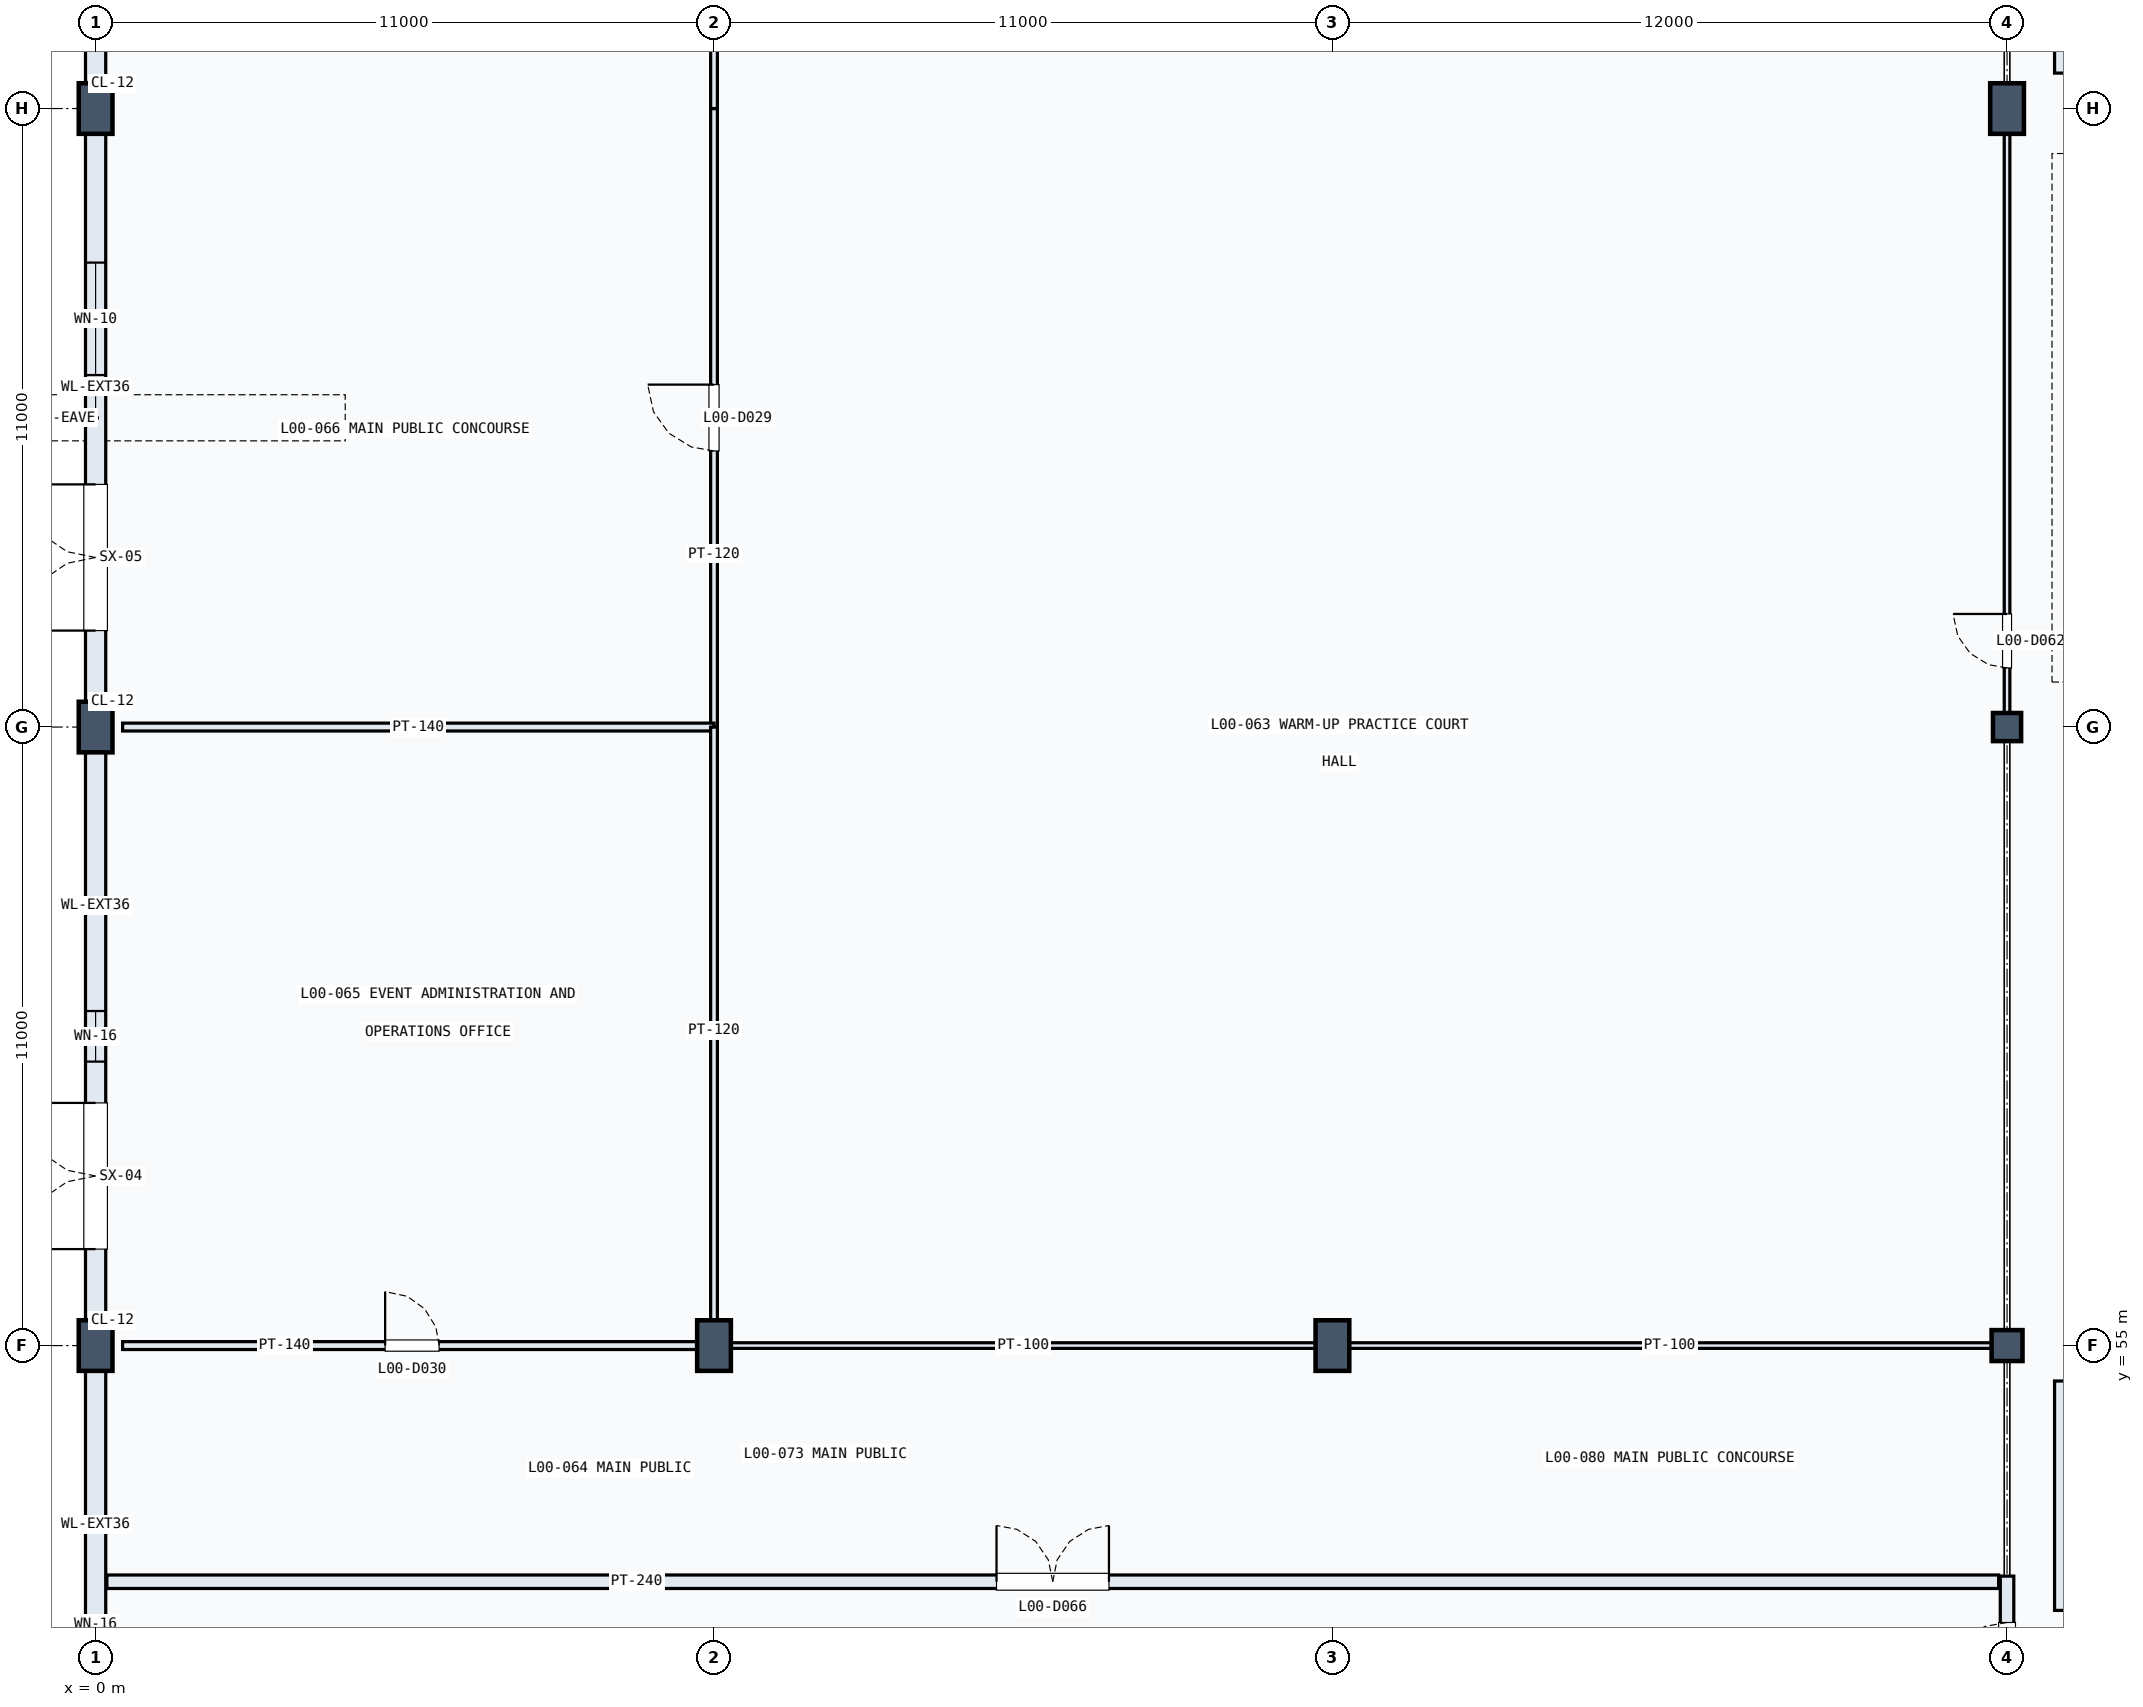
"""IFC4 building model, lengths in metres.
Left out: names, types, materials, properties, quantities, classifications, styles, units other than length and angle.
Written with IfcOpenShell. Run it as: python <this file> out.ifc"""

import sys

from ifc_helpers import new_model, si_unit, direction, frame, frame_2d, origin, origin_2d, place, context, subcontext, project, spatial, rectangle, extrude, element, fill, save


model = new_model("IFC4")
c1 = context("Model", 3, precision=1e-05, world=origin(), true_north=direction((0.0, 1.0)))
c2 = subcontext(c1, "Body", "Model", "MODEL_VIEW")
j1 = project(units=[si_unit("LENGTHUNIT", "METRE"), si_unit("PLANEANGLEUNIT", "RADIAN")], contexts=[c1])
p1 = place(None, origin())
s1 = spatial("IfcSite", under=j1, at=p1, CompositionType="ELEMENT")
p2 = place(p1, origin())
s2 = spatial("IfcBuilding", under=s1, at=p2, CompositionType="ELEMENT")
p3 = place(p2, origin())
s3 = spatial("IfcBuildingStorey", under=s2, at=p3, CompositionType="ELEMENT", Elevation=0.0)
for number, where, z_axis, x_axis in (
    (1, (0.0, 55.0, 0.0), (0.0, 0.0, 1.0), (1.0, 0.0, 0.0)),
    (2, (0.0, 66.0, 0.0), (0.0, 0.0, 1.0), (1.0, 0.0, 0.0)),
    (3, (0.0, 77.0, 0.0), (0.0, 0.0, 1.0), (1.0, 0.0, 0.0)),
    (4, (11.0, 55.0, 0.0), (0.0, 0.0, 1.0), (1.0, 0.0, 0.0)),
    (5, (22.0, 55.0, 0.0), (0.0, 0.0, 1.0), (1.0, 0.0, 0.0)),
):
    element("IfcColumn", number, at=place(p3, frame(where, z_axis=z_axis, x_axis=x_axis)), inside=s3, PredefinedType="COLUMN", context=c2, shape_type="SweptSolid", body=[
        extrude(rectangle(XDim=0.6, YDim=0.9, at=origin_2d()), origin(), (0.0, 0.0, 1.0), 5.4),
    ])
p4 = place(p3, frame((34.0, 55.0, 0.0), z_axis=(0.0, 0.0, 1.0), x_axis=(1.0, 0.0, 0.0)))
e6 = element("IfcColumn", 6, at=p4, inside=s3, PredefinedType="COLUMN", context=c2, shape_type="SweptSolid", body=[
    extrude(rectangle(XDim=0.55, YDim=0.55, at=origin_2d()), origin(), (0.0, 0.0, 1.0), 5.4),
])
p5 = place(p3, frame((34.0, 66.0, 0.0), z_axis=(0.0, 0.0, 1.0), x_axis=(1.0, 0.0, 0.0)))
e7 = element("IfcColumn", 7, at=p5, inside=s3, PredefinedType="COLUMN", context=c2, shape_type="SweptSolid", body=[
    extrude(rectangle(XDim=0.5, YDim=0.5, at=origin_2d()), origin(), (0.0, 0.0, 1.0), 5.4),
])
p6 = place(p3, frame((34.0, 77.0, 0.0), z_axis=(0.0, 0.0, 1.0), x_axis=(1.0, 0.0, 0.0)))
e8 = element("IfcColumn", 8, at=p6, inside=s3, PredefinedType="COLUMN", context=c2, shape_type="SweptSolid", body=[
    extrude(rectangle(XDim=0.6, YDim=0.9, at=origin_2d()), origin(), (0.0, 0.0, 1.0), 5.4),
])
p7 = place(p3, frame((0.0, 44.22, 0.0), z_axis=(0.0, 0.0, 1.0), x_axis=(0.0, 1.0, 0.0)))
e9 = element("IfcWall", 9, at=p7, inside=s3, PredefinedType="SOLIDWALL", context=c2, shape_type="SweptSolid", body=[
    extrude(rectangle(XDim=10.56, YDim=0.36, at=frame_2d((5.28, 0.0))), origin(), (0.0, 0.0, 1.0), 4.45),
])
p8 = place(p7, frame((1.496, 0.0, 0.0)))
e10 = element("IfcOpeningElement", 10, at=p8, cuts=e9, PredefinedType="OPENING", context=c2, shape_type="SweptSolid", body=[
    extrude(rectangle(XDim=2.6, YDim=2.4, at=frame_2d((1.3, 1.2))), frame((0.0, 0.19, 0.0), z_axis=(0.0, -1.0, 0.0), x_axis=(1.0, 0.0, 0.0)), (0.0, 0.0, 1.0), 0.38),
])
p9 = place(p7, frame((4.83, 0.0, 0.8)))
e11 = element("IfcOpeningElement", 11, at=p9, cuts=e9, PredefinedType="OPENING", context=c2, shape_type="SweptSolid", body=[
    extrude(rectangle(XDim=0.9, YDim=1.8, at=frame_2d((0.45, 0.9))), frame((0.0, 0.19, 0.0), z_axis=(0.0, -1.0, 0.0), x_axis=(1.0, 0.0, 0.0)), (0.0, 0.0, 1.0), 0.38),
])
p10 = place(p3, frame((0.0, 55.22, 0.0), z_axis=(0.0, 0.0, 1.0), x_axis=(0.0, 1.0, 0.0)))
e12 = element("IfcWall", 12, at=p10, inside=s3, PredefinedType="SOLIDWALL", context=c2, shape_type="SweptSolid", body=[
    extrude(rectangle(XDim=10.56, YDim=0.36, at=frame_2d((5.28, 0.0))), origin(), (0.0, 0.0, 1.0), 4.45),
])
p11 = place(p10, frame((1.496, 0.0, 0.0)))
e13 = element("IfcOpeningElement", 13, at=p11, cuts=e12, PredefinedType="OPENING", context=c2, shape_type="SweptSolid", body=[
    extrude(rectangle(XDim=2.6, YDim=2.4, at=frame_2d((1.3, 1.2))), frame((0.0, 0.19, 0.0), z_axis=(0.0, -1.0, 0.0), x_axis=(1.0, 0.0, 0.0)), (0.0, 0.0, 1.0), 0.38),
])
p12 = place(p10, frame((4.83, 0.0, 0.8)))
e14 = element("IfcOpeningElement", 14, at=p12, cuts=e12, PredefinedType="OPENING", context=c2, shape_type="SweptSolid", body=[
    extrude(rectangle(XDim=0.9, YDim=1.8, at=frame_2d((0.45, 0.9))), frame((0.0, 0.19, 0.0), z_axis=(0.0, -1.0, 0.0), x_axis=(1.0, 0.0, 0.0)), (0.0, 0.0, 1.0), 0.38),
])
p13 = place(p3, frame((0.0, 66.22, 0.0), z_axis=(0.0, 0.0, 1.0), x_axis=(0.0, 1.0, 0.0)))
e15 = element("IfcWall", 15, at=p13, inside=s3, PredefinedType="SOLIDWALL", context=c2, shape_type="SweptSolid", body=[
    extrude(rectangle(XDim=10.56, YDim=0.36, at=frame_2d((5.28, 0.0))), origin(), (0.0, 0.0, 1.0), 4.45),
])
p14 = place(p13, frame((1.496, 0.0, 0.0)))
e16 = element("IfcOpeningElement", 16, at=p14, cuts=e15, PredefinedType="OPENING", context=c2, shape_type="SweptSolid", body=[
    extrude(rectangle(XDim=2.6, YDim=2.4, at=frame_2d((1.3, 1.2))), frame((0.0, 0.19, 0.0), z_axis=(0.0, -1.0, 0.0), x_axis=(1.0, 0.0, 0.0)), (0.0, 0.0, 1.0), 0.38),
])
p15 = place(p13, frame((6.04, 0.0, 0.9)))
e17 = element("IfcOpeningElement", 17, at=p15, cuts=e15, PredefinedType="OPENING", context=c2, shape_type="SweptSolid", body=[
    extrude(rectangle(XDim=2.0, YDim=1.65, at=frame_2d((1.0, 0.825))), frame((0.0, 0.19, 0.0), z_axis=(0.0, -1.0, 0.0), x_axis=(1.0, 0.0, 0.0)), (0.0, 0.0, 1.0), 0.38),
])
p16 = place(p3, frame((0.0, 77.22, 0.0), z_axis=(0.0, 0.0, 1.0), x_axis=(0.0, 1.0, 0.0)))
e18 = element("IfcWall", 18, at=p16, inside=s3, PredefinedType="SOLIDWALL", context=c2, shape_type="SweptSolid", body=[
    extrude(rectangle(XDim=10.56, YDim=0.36, at=frame_2d((5.28, 0.0))), origin(), (0.0, 0.0, 1.0), 4.45),
])
p17 = place(p16, frame((1.496, 0.0, 0.0)))
e19 = element("IfcOpeningElement", 19, at=p17, cuts=e18, PredefinedType="OPENING", context=c2, shape_type="SweptSolid", body=[
    extrude(rectangle(XDim=2.6, YDim=2.4, at=frame_2d((1.3, 1.2))), frame((0.0, 0.19, 0.0), z_axis=(0.0, -1.0, 0.0), x_axis=(1.0, 0.0, 0.0)), (0.0, 0.0, 1.0), 0.38),
])
p18 = place(p16, frame((5.94, 0.0, 0.85)))
e20 = element("IfcOpeningElement", 20, at=p18, cuts=e18, PredefinedType="OPENING", context=c2, shape_type="SweptSolid", body=[
    extrude(rectangle(XDim=2.2, YDim=1.95, at=frame_2d((1.1, 0.975))), frame((0.0, 0.19, 0.0), z_axis=(0.0, -1.0, 0.0), x_axis=(1.0, 0.0, 0.0)), (0.0, 0.0, 1.0), 0.38),
])
for number, where, z_axis, x_axis in (
    (21, (34.96, 77.63, 0.0), (0.0, 0.0, 1.0), (0.0, 1.0, 0.0)),
    (22, (34.96, 50.29, 0.0), (0.0, 0.0, 1.0), (0.0, 1.0, 0.0)),
):
    element("IfcWall", number, at=place(p3, frame(where, z_axis=z_axis, x_axis=x_axis)), inside=s3, PredefinedType="SOLIDWALL", context=c2, shape_type="SweptSolid", body=[
        extrude(rectangle(XDim=4.08, YDim=0.23, at=frame_2d((2.04, 0.0))), origin(), (0.0, 0.0, 1.0), 4.45),
    ])
p19 = place(p3, frame((11.0, 66.0, 0.0), z_axis=(0.0, 0.0, 1.0), x_axis=(0.0, 1.0, 0.0)))
e23 = element("IfcWall", 23, at=p19, inside=s3, PredefinedType="PARTITIONING", context=c2, shape_type="SweptSolid", body=[
    extrude(rectangle(XDim=11.0, YDim=0.12, at=frame_2d((5.5, 0.0))), origin(), (0.0, 0.0, 1.0), 5.06),
])
p20 = place(p19, frame((4.91, 0.0, 0.0)))
e24 = element("IfcOpeningElement", 24, at=p20, cuts=e23, PredefinedType="OPENING", context=c2, shape_type="SweptSolid", body=[
    extrude(rectangle(XDim=1.18, YDim=2.15, at=frame_2d((0.59, 1.075))), frame((0.0, 0.07, 0.0), z_axis=(0.0, -1.0, 0.0), x_axis=(1.0, 0.0, 0.0)), (0.0, 0.0, 1.0), 0.14),
])
p21 = place(p3, frame((11.0, 77.0, 0.0), z_axis=(0.0, 0.0, 1.0), x_axis=(0.0, 1.0, 0.0)))
e25 = element("IfcWall", 25, at=p21, inside=s3, PredefinedType="PARTITIONING", context=c2, shape_type="SweptSolid", body=[
    extrude(rectangle(XDim=10.78, YDim=0.12, at=frame_2d((5.39, 0.0))), origin(), (0.0, 0.0, 1.0), 4.15),
])
p22 = place(p3, frame((11.22, 55.0, 0.0), z_axis=(0.0, 0.0, 1.0), x_axis=(1.0, 0.0, 0.0)))
e26 = element("IfcWall", 26, at=p22, inside=s3, PredefinedType="PARTITIONING", context=c2, shape_type="SweptSolid", body=[
    extrude(rectangle(XDim=10.56, YDim=0.1, at=frame_2d((5.28, 0.0))), origin(), (0.0, 0.0, 1.0), 4.438),
])
p23 = place(p3, frame((22.22, 55.0, 0.0), z_axis=(0.0, 0.0, 1.0), x_axis=(1.0, 0.0, 0.0)))
e27 = element("IfcWall", 27, at=p23, inside=s3, PredefinedType="PARTITIONING", context=c2, shape_type="SweptSolid", body=[
    extrude(rectangle(XDim=11.56, YDim=0.1, at=frame_2d((5.78, 0.0))), origin(), (0.0, 0.0, 1.0), 4.25),
])
p24 = place(p3, frame((0.48, 55.0, 0.0), z_axis=(0.0, 0.0, 1.0), x_axis=(1.0, 0.0, 0.0)))
e28 = element("IfcWall", 28, at=p24, inside=s3, PredefinedType="PARTITIONING", context=c2, shape_type="SweptSolid", body=[
    extrude(rectangle(XDim=10.3, YDim=0.14, at=frame_2d((5.15, 0.0))), origin(), (0.0, 0.0, 1.0), 4.438),
])
p25 = place(p24, frame((4.67, 0.0, 0.0)))
e29 = element("IfcOpeningElement", 29, at=p25, cuts=e28, PredefinedType="OPENING", context=c2, shape_type="SweptSolid", body=[
    extrude(rectangle(XDim=0.96, YDim=2.15, at=frame_2d((0.48, 1.075))), frame((0.0, 0.08, 0.0), z_axis=(0.0, -1.0, 0.0), x_axis=(1.0, 0.0, 0.0)), (0.0, 0.0, 1.0), 0.16),
])
p26 = place(p3, frame((0.48, 66.0, 0.0), z_axis=(0.0, 0.0, 1.0), x_axis=(1.0, 0.0, 0.0)))
e30 = element("IfcWall", 30, at=p26, inside=s3, PredefinedType="PARTITIONING", context=c2, shape_type="SweptSolid", body=[
    extrude(rectangle(XDim=10.52, YDim=0.14, at=frame_2d((5.26, 0.0))), origin(), (0.0, 0.0, 1.0), 4.55),
])
p27 = place(p3, frame((11.0, 55.22, 0.0), z_axis=(0.0, 0.0, 1.0), x_axis=(0.0, 1.0, 0.0)))
e31 = element("IfcWall", 31, at=p27, inside=s3, PredefinedType="PARTITIONING", context=c2, shape_type="SweptSolid", body=[
    extrude(rectangle(XDim=10.78, YDim=0.12, at=frame_2d((5.39, 0.0))), origin(), (0.0, 0.0, 1.0), 4.438),
])
p28 = place(p3, frame((34.0, 66.21, 0.0), z_axis=(0.0, 0.0, 1.0), x_axis=(0.0, 1.0, 0.0)))
e32 = element("IfcWall", 32, at=p28, inside=s3, PredefinedType="PARTITIONING", context=c2, shape_type="SweptSolid", body=[
    extrude(rectangle(XDim=10.57, YDim=0.1, at=frame_2d((5.285, 0.0))), origin(), (0.0, 0.0, 1.0), 4.35),
])
p29 = place(p28, frame((0.841, 0.0, 0.0)))
e33 = element("IfcOpeningElement", 33, at=p29, cuts=e32, PredefinedType="OPENING", context=c2, shape_type="SweptSolid", body=[
    extrude(rectangle(XDim=0.96, YDim=2.15, at=frame_2d((0.48, 1.075))), frame((0.0, 0.06, 0.0), z_axis=(0.0, -1.0, 0.0), x_axis=(1.0, 0.0, 0.0)), (0.0, 0.0, 1.0), 0.12),
])
p30 = place(p3, frame((0.2, 50.8, 0.0), z_axis=(0.0, 0.0, 1.0), x_axis=(1.0, 0.0, 0.0)))
e34 = element("IfcWall", 34, at=p30, inside=s3, PredefinedType="PARTITIONING", context=c2, shape_type="SweptSolid", body=[
    extrude(rectangle(XDim=33.65, YDim=0.24, at=frame_2d((16.825, 0.0))), origin(), (0.0, 0.0, 1.0), 4.25),
])
p31 = place(p30, frame((15.825, 0.0, 0.0)))
e35 = element("IfcOpeningElement", 35, at=p31, cuts=e34, PredefinedType="OPENING", context=c2, shape_type="SweptSolid", body=[
    extrude(rectangle(XDim=2.0, YDim=2.25, at=frame_2d((1.0, 1.125))), frame((0.0, 0.13, 0.0), z_axis=(0.0, -1.0, 0.0), x_axis=(1.0, 0.0, 0.0)), (0.0, 0.0, 1.0), 0.26),
])
p32 = place(p3, frame((34.0, 48.1, 0.0), z_axis=(0.0, 0.0, 1.0), x_axis=(0.0, 1.0, 0.0)))
e36 = element("IfcWall", 36, at=p32, inside=s3, PredefinedType="PARTITIONING", context=c2, shape_type="SweptSolid", body=[
    extrude(rectangle(XDim=2.8, YDim=0.24, at=frame_2d((1.4, 0.0))), origin(), (0.0, 0.0, 1.0), 4.25),
])
p33 = place(p32, frame((0.825, 0.0, 0.0)))
e37 = element("IfcOpeningElement", 37, at=p33, cuts=e36, PredefinedType="OPENING", context=c2, shape_type="SweptSolid", body=[
    extrude(rectangle(XDim=1.15, YDim=2.2, at=frame_2d((0.575, 1.1))), frame((0.0, 0.13, 0.0), z_axis=(0.0, -1.0, 0.0), x_axis=(1.0, 0.0, 0.0)), (0.0, 0.0, 1.0), 0.26),
])
p34 = place(p11, origin())
e38 = element("IfcDoor", 38, at=p34, inside=s3, OperationType="DOUBLE_DOOR_SINGLE_SWING", PredefinedType="DOOR", context=c2, shape_type="SweptSolid", body=[
    extrude(rectangle(XDim=2.6, YDim=2.4, at=frame_2d((1.3, 1.2))), frame((0.0, 0.025, 0.0), z_axis=(0.0, -1.0, 0.0), x_axis=(1.0, 0.0, 0.0)), (0.0, 0.0, 1.0), 0.05),
])
fill(e13, e38)
p35 = place(p14, origin())
e39 = element("IfcDoor", 39, at=p35, inside=s3, OperationType="DOUBLE_DOOR_SINGLE_SWING", PredefinedType="DOOR", context=c2, shape_type="SweptSolid", body=[
    extrude(rectangle(XDim=2.6, YDim=2.4, at=frame_2d((1.3, 1.2))), frame((0.0, 0.025, 0.0), z_axis=(0.0, -1.0, 0.0), x_axis=(1.0, 0.0, 0.0)), (0.0, 0.0, 1.0), 0.05),
])
fill(e16, e39)
p36 = place(p12, origin())
e40 = element("IfcWindow", 40, at=p36, inside=s3, PartitioningType="SINGLE_PANEL", PredefinedType="WINDOW", context=c2, shape_type="SweptSolid", body=[
    extrude(rectangle(XDim=0.9, YDim=1.8, at=frame_2d((0.45, 0.9))), frame((0.0, 0.03, 0.0), z_axis=(0.0, -1.0, 0.0), x_axis=(1.0, 0.0, 0.0)), (0.0, 0.0, 1.0), 0.06),
])
fill(e14, e40)
p37 = place(p15, origin())
e41 = element("IfcWindow", 41, at=p37, inside=s3, PartitioningType="SINGLE_PANEL", PredefinedType="WINDOW", context=c2, shape_type="SweptSolid", body=[
    extrude(rectangle(XDim=2.0, YDim=1.65, at=frame_2d((1.0, 0.825))), frame((0.0, 0.03, 0.0), z_axis=(0.0, -1.0, 0.0), x_axis=(1.0, 0.0, 0.0)), (0.0, 0.0, 1.0), 0.06),
])
fill(e17, e41)
p38 = place(p20, origin())
e42 = element("IfcDoor", 42, at=p38, inside=s3, OperationType="SINGLE_SWING_RIGHT", PredefinedType="DOOR", context=c2, shape_type="SweptSolid", body=[
    extrude(rectangle(XDim=1.18, YDim=2.15, at=frame_2d((0.59, 1.075))), frame((0.0, 0.025, 0.0), z_axis=(0.0, -1.0, 0.0), x_axis=(1.0, 0.0, 0.0)), (0.0, 0.0, 1.0), 0.05),
])
fill(e24, e42)
p39 = place(p25, origin())
e43 = element("IfcDoor", 43, at=p39, inside=s3, OperationType="SINGLE_SWING_LEFT", PredefinedType="DOOR", context=c2, shape_type="SweptSolid", body=[
    extrude(rectangle(XDim=0.96, YDim=2.15, at=frame_2d((0.48, 1.075))), frame((0.0, 0.025, 0.0), z_axis=(0.0, -1.0, 0.0), x_axis=(1.0, 0.0, 0.0)), (0.0, 0.0, 1.0), 0.05),
])
fill(e29, e43)
p40 = place(p29, origin())
e44 = element("IfcDoor", 44, at=p40, inside=s3, OperationType="SINGLE_SWING_RIGHT", PredefinedType="DOOR", context=c2, shape_type="SweptSolid", body=[
    extrude(rectangle(XDim=0.96, YDim=2.15, at=frame_2d((0.48, 1.075))), frame((0.0, 0.025, 0.0), z_axis=(0.0, -1.0, 0.0), x_axis=(1.0, 0.0, 0.0)), (0.0, 0.0, 1.0), 0.05),
])
fill(e33, e44)
p41 = place(p31, origin())
e45 = element("IfcDoor", 45, at=p41, inside=s3, OperationType="DOUBLE_DOOR_SINGLE_SWING", PredefinedType="DOOR", context=c2, shape_type="SweptSolid", body=[
    extrude(rectangle(XDim=2.0, YDim=2.25, at=frame_2d((1.0, 1.125))), frame((0.0, 0.025, 0.0), z_axis=(0.0, -1.0, 0.0), x_axis=(1.0, 0.0, 0.0)), (0.0, 0.0, 1.0), 0.05),
])
fill(e35, e45)
p42 = place(p33, origin())
e46 = element("IfcDoor", 46, at=p42, inside=s3, OperationType="SINGLE_SWING_LEFT", PredefinedType="DOOR", context=c2, shape_type="SweptSolid", body=[
    extrude(rectangle(XDim=1.15, YDim=2.2, at=frame_2d((0.575, 1.1))), frame((0.0, 0.025, 0.0), z_axis=(0.0, -1.0, 0.0), x_axis=(1.0, 0.0, 0.0)), (0.0, 0.0, 1.0), 0.05),
])
fill(e37, e46)
save(model, sys.argv[1])
